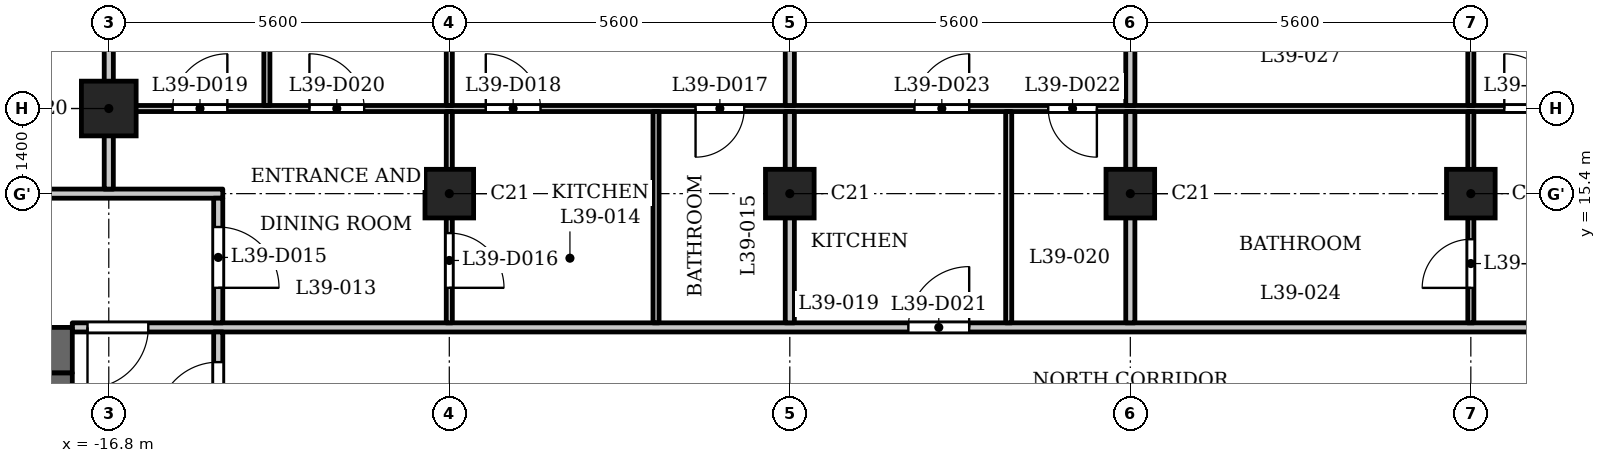
"""IFC4 building model, lengths in metres.
Left out: names, types, materials, properties, quantities, classifications, styles, units other than length and angle.
Written with IfcOpenShell. Run it as: python <this file> out.ifc"""

import sys

from ifc_helpers import new_model, si_unit, direction, frame, frame_2d, origin, origin_2d, place, context, subcontext, project, spatial, rectangle, extrude, element, fill, save


model = new_model("IFC4")
c1 = context("Model", 3, precision=1e-05, world=origin(), true_north=direction((0.0, 1.0)))
c2 = subcontext(c1, "Body", "Model", "MODEL_VIEW")
j1 = project(units=[si_unit("LENGTHUNIT", "METRE"), si_unit("PLANEANGLEUNIT", "RADIAN")], contexts=[c1])
p1 = place(None, origin())
s1 = spatial("IfcSite", under=j1, at=p1, CompositionType="ELEMENT")
p2 = place(p1, origin())
s2 = spatial("IfcBuilding", under=s1, at=p2, CompositionType="ELEMENT")
p3 = place(p2, frame((0.0, 0.0, 153.6)))
s3 = spatial("IfcBuildingStorey", under=s2, at=p3, CompositionType="ELEMENT", Elevation=153.6)
p4 = place(p3, frame((-16.8, 16.8, 0.0), z_axis=(0.0, 0.0, 1.0), x_axis=(1.0, 0.0, 0.0)))
e1 = element("IfcColumn", 1, at=p4, inside=s3, PredefinedType="COLUMN", context=c2, shape_type="SweptSolid", body=[
    extrude(rectangle(XDim=0.9, YDim=0.9, at=origin_2d()), origin(), (0.0, 0.0, 1.0), 3.5),
])
for number, where, z_axis, x_axis in (
    (2, (-11.2, 15.4, 0.0), (0.0, 0.0, 1.0), (1.0, 0.0, 0.0)),
    (3, (-5.6, 15.4, 0.0), (0.0, 0.0, 1.0), (1.0, 0.0, 0.0)),
    (4, (0.0, 15.4, 0.0), (0.0, 0.0, 1.0), (1.0, 0.0, 0.0)),
    (5, (5.6, 15.4, 0.0), (0.0, 0.0, 1.0), (1.0, 0.0, 0.0)),
):
    element("IfcColumn", number, at=place(p3, frame(where, z_axis=z_axis, x_axis=x_axis)), inside=s3, PredefinedType="COLUMN", context=c2, shape_type="SweptSolid", body=[
        extrude(rectangle(XDim=0.8, YDim=0.8, at=origin_2d()), origin(), (0.0, 0.0, 1.0), 3.5),
    ])
p5 = place(p3, frame((-17.4, 12.825, 0.0), z_axis=(0.0, 0.0, 1.0), x_axis=(-1.0, 0.0, 0.0)))
e6 = element("IfcWall", 6, at=p5, inside=s3, PredefinedType="SHEAR", context=c2, shape_type="SweptSolid", body=[
    extrude(rectangle(XDim=10.4, YDim=0.75, at=frame_2d((5.2, 0.0))), origin(), (0.0, 0.0, 1.0), 3.2),
])
p6 = place(p3, frame((-17.6, -12.45, 0.0), z_axis=(0.0, 0.0, 1.0), x_axis=(0.0, 1.0, 0.0)))
e7 = element("IfcWall", 7, at=p6, inside=s3, PredefinedType="SHEAR", context=c2, shape_type="SweptSolid", body=[
    extrude(rectangle(XDim=24.9, YDim=0.4, at=frame_2d((12.45, 0.0))), origin(), (0.0, 0.0, 1.0), 3.2),
])
p7 = place(p6, frame((6.325, 0.0, 0.0)))
e8 = element("IfcOpeningElement", 8, at=p7, cuts=e7, PredefinedType="OPENING", context=c2, shape_type="SweptSolid", body=[
    extrude(rectangle(XDim=0.9, YDim=2.1, at=frame_2d((0.45, 1.05))), frame((0.0, 0.21, 0.0), z_axis=(0.0, -1.0, 0.0), x_axis=(1.0, 0.0, 0.0)), (0.0, 0.0, 1.0), 0.42),
])
p8 = place(p6, frame((9.925, 0.0, 0.0)))
e9 = element("IfcOpeningElement", 9, at=p8, cuts=e7, PredefinedType="OPENING", context=c2, shape_type="SweptSolid", body=[
    extrude(rectangle(XDim=0.9, YDim=2.1, at=frame_2d((0.45, 1.05))), frame((0.0, 0.21, 0.0), z_axis=(0.0, -1.0, 0.0), x_axis=(1.0, 0.0, 0.0)), (0.0, 0.0, 1.0), 0.42),
])
p9 = place(p6, frame((15.6, 0.0, 0.0)))
e10 = element("IfcOpeningElement", 10, at=p9, cuts=e7, PredefinedType="OPENING", context=c2, shape_type="SweptSolid", body=[
    extrude(rectangle(XDim=1.1, YDim=2.1, at=frame_2d((0.55, 1.05))), frame((0.0, 0.21, 0.0), z_axis=(0.0, -1.0, 0.0), x_axis=(1.0, 0.0, 0.0)), (0.0, 0.0, 1.0), 0.42),
])
p10 = place(p6, frame((18.0, 0.0, 0.0)))
e11 = element("IfcOpeningElement", 11, at=p10, cuts=e7, PredefinedType="OPENING", context=c2, shape_type="SweptSolid", body=[
    extrude(rectangle(XDim=1.1, YDim=2.1, at=frame_2d((0.55, 1.05))), frame((0.0, 0.21, 0.0), z_axis=(0.0, -1.0, 0.0), x_axis=(1.0, 0.0, 0.0)), (0.0, 0.0, 1.0), 0.42),
])
p11 = place(p6, frame((23.025, 0.0, 0.0)))
e12 = element("IfcOpeningElement", 12, at=p11, cuts=e7, PredefinedType="OPENING", context=c2, shape_type="SweptSolid", body=[
    extrude(rectangle(XDim=1.1, YDim=2.1, at=frame_2d((0.55, 1.05))), frame((0.0, 0.21, 0.0), z_axis=(0.0, -1.0, 0.0), x_axis=(1.0, 0.0, 0.0)), (0.0, 0.0, 1.0), 0.42),
])
p12 = place(p6, frame((0.775, 0.0, 0.0)))
e13 = element("IfcOpeningElement", 13, at=p12, cuts=e7, PredefinedType="OPENING", context=c2, shape_type="SweptSolid", body=[
    extrude(rectangle(XDim=1.1, YDim=2.1, at=frame_2d((0.55, 1.05))), frame((0.0, 0.21, 0.0), z_axis=(0.0, -1.0, 0.0), x_axis=(1.0, 0.0, 0.0)), (0.0, 0.0, 1.0), 0.42),
])
p13 = place(p6, frame((12.925, 0.0, 0.0)))
e14 = element("IfcOpeningElement", 14, at=p13, cuts=e7, PredefinedType="OPENING", context=c2, shape_type="SweptSolid", body=[
    extrude(rectangle(XDim=1.8, YDim=2.1, at=frame_2d((0.9, 1.05))), frame((0.0, 0.21, 0.0), z_axis=(0.0, -1.0, 0.0), x_axis=(1.0, 0.0, 0.0)), (0.0, 0.0, 1.0), 0.42),
])
p14 = place(p3, frame((-17.4, 13.2, 0.0), z_axis=(0.0, 0.0, 1.0), x_axis=(1.0, 0.0, 0.0)))
e15 = element("IfcWall", 15, at=p14, inside=s3, PredefinedType="PARTITIONING", context=c2, shape_type="SweptSolid", body=[
    extrude(rectangle(XDim=34.8, YDim=0.15, at=frame_2d((17.4, 0.0))), origin(), (0.0, 0.0, 1.0), 3.2),
])
p15 = place(p14, frame((0.25, 0.0, 0.0)))
e16 = element("IfcOpeningElement", 16, at=p15, cuts=e15, PredefinedType="OPENING", context=c2, shape_type="SweptSolid", body=[
    extrude(rectangle(XDim=1.0, YDim=2.1, at=frame_2d((0.5, 1.05))), frame((0.0, 0.085, 0.0), z_axis=(0.0, -1.0, 0.0), x_axis=(1.0, 0.0, 0.0)), (0.0, 0.0, 1.0), 0.17),
])
p16 = place(p14, frame((33.65, 0.0, 0.0)))
e17 = element("IfcOpeningElement", 17, at=p16, cuts=e15, PredefinedType="OPENING", context=c2, shape_type="SweptSolid", body=[
    extrude(rectangle(XDim=1.0, YDim=2.1, at=frame_2d((0.5, 1.05))), frame((0.0, 0.085, 0.0), z_axis=(0.0, -1.0, 0.0), x_axis=(1.0, 0.0, 0.0)), (0.0, 0.0, 1.0), 0.17),
])
p17 = place(p14, frame((13.75, 0.0, 0.0)))
e18 = element("IfcOpeningElement", 18, at=p17, cuts=e15, PredefinedType="OPENING", context=c2, shape_type="SweptSolid", body=[
    extrude(rectangle(XDim=1.0, YDim=2.1, at=frame_2d((0.5, 1.05))), frame((0.0, 0.085, 0.0), z_axis=(0.0, -1.0, 0.0), x_axis=(1.0, 0.0, 0.0)), (0.0, 0.0, 1.0), 0.17),
])
p18 = place(p3, frame((-27.484, 15.4, 0.0), z_axis=(0.0, 0.0, 1.0), x_axis=(1.0, 0.0, 0.0)))
e19 = element("IfcWall", 19, at=p18, inside=s3, PredefinedType="PARTITIONING", context=c2, shape_type="SweptSolid", body=[
    extrude(rectangle(XDim=12.559, YDim=0.15, at=frame_2d((6.279, 0.0))), origin(), (0.0, 0.0, 1.0), 3.2),
])
p19 = place(p18, frame((5.784, 0.0, 0.0)))
e20 = element("IfcOpeningElement", 20, at=p19, cuts=e19, PredefinedType="OPENING", context=c2, shape_type="SweptSolid", body=[
    extrude(rectangle(XDim=1.0, YDim=2.1, at=frame_2d((0.5, 1.05))), frame((0.0, 0.085, 0.0), z_axis=(0.0, -1.0, 0.0), x_axis=(1.0, 0.0, 0.0)), (0.0, 0.0, 1.0), 0.17),
])
p20 = place(p3, frame((-16.725, 16.8, 0.0), z_axis=(0.0, 0.0, 1.0), x_axis=(1.0, 0.0, 0.0)))
e21 = element("IfcWall", 21, at=p20, inside=s3, PredefinedType="PARTITIONING", context=c2, shape_type="SweptSolid", body=[
    extrude(rectangle(XDim=33.45, YDim=0.1, at=frame_2d((16.725, 0.0))), origin(), (0.0, 0.0, 1.0), 3.2),
])
p21 = place(p20, frame((9.575, 0.0, 0.0)))
e22 = element("IfcOpeningElement", 22, at=p21, cuts=e21, PredefinedType="OPENING", context=c2, shape_type="SweptSolid", body=[
    extrude(rectangle(XDim=0.8, YDim=2.1, at=frame_2d((0.4, 1.05))), frame((0.0, 0.06, 0.0), z_axis=(0.0, -1.0, 0.0), x_axis=(1.0, 0.0, 0.0)), (0.0, 0.0, 1.0), 0.12),
])
p22 = place(p20, frame((6.125, 0.0, 0.0)))
e23 = element("IfcOpeningElement", 23, at=p22, cuts=e21, PredefinedType="OPENING", context=c2, shape_type="SweptSolid", body=[
    extrude(rectangle(XDim=0.9, YDim=2.1, at=frame_2d((0.45, 1.05))), frame((0.0, 0.06, 0.0), z_axis=(0.0, -1.0, 0.0), x_axis=(1.0, 0.0, 0.0)), (0.0, 0.0, 1.0), 0.12),
])
p23 = place(p20, frame((0.975, 0.0, 0.0)))
e24 = element("IfcOpeningElement", 24, at=p23, cuts=e21, PredefinedType="OPENING", context=c2, shape_type="SweptSolid", body=[
    extrude(rectangle(XDim=0.9, YDim=2.1, at=frame_2d((0.45, 1.05))), frame((0.0, 0.06, 0.0), z_axis=(0.0, -1.0, 0.0), x_axis=(1.0, 0.0, 0.0)), (0.0, 0.0, 1.0), 0.12),
])
p24 = place(p20, frame((3.225, 0.0, 0.0)))
e25 = element("IfcOpeningElement", 25, at=p24, cuts=e21, PredefinedType="OPENING", context=c2, shape_type="SweptSolid", body=[
    extrude(rectangle(XDim=0.9, YDim=2.1, at=frame_2d((0.45, 1.05))), frame((0.0, 0.06, 0.0), z_axis=(0.0, -1.0, 0.0), x_axis=(1.0, 0.0, 0.0)), (0.0, 0.0, 1.0), 0.12),
])
p25 = place(p20, frame((15.375, 0.0, 0.0)))
e26 = element("IfcOpeningElement", 26, at=p25, cuts=e21, PredefinedType="OPENING", context=c2, shape_type="SweptSolid", body=[
    extrude(rectangle(XDim=0.8, YDim=2.1, at=frame_2d((0.4, 1.05))), frame((0.0, 0.06, 0.0), z_axis=(0.0, -1.0, 0.0), x_axis=(1.0, 0.0, 0.0)), (0.0, 0.0, 1.0), 0.12),
])
p26 = place(p20, frame((13.175, 0.0, 0.0)))
e27 = element("IfcOpeningElement", 27, at=p26, cuts=e21, PredefinedType="OPENING", context=c2, shape_type="SweptSolid", body=[
    extrude(rectangle(XDim=0.9, YDim=2.1, at=frame_2d((0.45, 1.05))), frame((0.0, 0.06, 0.0), z_axis=(0.0, -1.0, 0.0), x_axis=(1.0, 0.0, 0.0)), (0.0, 0.0, 1.0), 0.12),
])
p27 = place(p20, frame((31.975, 0.0, 0.0)))
e28 = element("IfcOpeningElement", 28, at=p27, cuts=e21, PredefinedType="OPENING", context=c2, shape_type="SweptSolid", body=[
    extrude(rectangle(XDim=0.9, YDim=2.1, at=frame_2d((0.45, 1.05))), frame((0.0, 0.06, 0.0), z_axis=(0.0, -1.0, 0.0), x_axis=(1.0, 0.0, 0.0)), (0.0, 0.0, 1.0), 0.12),
])
p28 = place(p20, frame((22.875, 0.0, 0.0)))
e29 = element("IfcOpeningElement", 29, at=p28, cuts=e21, PredefinedType="OPENING", context=c2, shape_type="SweptSolid", body=[
    extrude(rectangle(XDim=0.9, YDim=2.1, at=frame_2d((0.45, 1.05))), frame((0.0, 0.06, 0.0), z_axis=(0.0, -1.0, 0.0), x_axis=(1.0, 0.0, 0.0)), (0.0, 0.0, 1.0), 0.12),
])
p29 = place(p3, frame((-16.8, 15.475, 0.0), z_axis=(0.0, 0.0, 1.0), x_axis=(0.0, 1.0, 0.0)))
e30 = element("IfcWall", 30, at=p29, inside=s3, PredefinedType="PARTITIONING", context=c2, shape_type="SweptSolid", body=[
    extrude(rectangle(XDim=7.455, YDim=0.15, at=frame_2d((3.728, 0.0))), origin(), (0.0, 0.0, 1.0), 3.2),
])
p30 = place(p3, frame((-15.0, 6.769, 0.0), z_axis=(0.0, 0.0, 1.0), x_axis=(0.0, 1.0, 0.0)))
e31 = element("IfcWall", 31, at=p30, inside=s3, PredefinedType="PARTITIONING", context=c2, shape_type="SweptSolid", body=[
    extrude(rectangle(XDim=6.356, YDim=0.15, at=frame_2d((3.178, 0.0))), origin(), (0.0, 0.0, 1.0), 3.2),
])
p31 = place(p30, frame((4.86, 0.0, 0.0)))
e32 = element("IfcOpeningElement", 32, at=p31, cuts=e31, PredefinedType="OPENING", context=c2, shape_type="SweptSolid", body=[
    extrude(rectangle(XDim=1.0, YDim=2.1, at=frame_2d((0.5, 1.05))), frame((0.0, 0.085, 0.0), z_axis=(0.0, -1.0, 0.0), x_axis=(1.0, 0.0, 0.0)), (0.0, 0.0, 1.0), 0.17),
])
p32 = place(p3, frame((-15.0, 13.275, 0.0), z_axis=(0.0, 0.0, 1.0), x_axis=(0.0, 1.0, 0.0)))
e33 = element("IfcWall", 33, at=p32, inside=s3, PredefinedType="PARTITIONING", context=c2, shape_type="SweptSolid", body=[
    extrude(rectangle(XDim=2.05, YDim=0.15, at=frame_2d((1.025, 0.0))), origin(), (0.0, 0.0, 1.0), 3.2),
])
p33 = place(p32, frame((0.576, 0.0, 0.0)))
e34 = element("IfcOpeningElement", 34, at=p33, cuts=e33, PredefinedType="OPENING", context=c2, shape_type="SweptSolid", body=[
    extrude(rectangle(XDim=1.0, YDim=2.1, at=frame_2d((0.5, 1.05))), frame((0.0, 0.085, 0.0), z_axis=(0.0, -1.0, 0.0), x_axis=(1.0, 0.0, 0.0)), (0.0, 0.0, 1.0), 0.17),
])
p34 = place(p3, frame((-14.2, 16.85, 0.0), z_axis=(0.0, 0.0, 1.0), x_axis=(0.0, 1.0, 0.0)))
e35 = element("IfcWall", 35, at=p34, inside=s3, PredefinedType="PARTITIONING", context=c2, shape_type="SweptSolid", body=[
    extrude(rectangle(XDim=5.23, YDim=0.1, at=frame_2d((2.615, 0.0))), origin(), (0.0, 0.0, 1.0), 3.2),
])
p35 = place(p3, frame((-11.2, 13.275, 0.0), z_axis=(0.0, 0.0, 1.0), x_axis=(0.0, 1.0, 0.0)))
e36 = element("IfcWall", 36, at=p35, inside=s3, PredefinedType="PARTITIONING", context=c2, shape_type="SweptSolid", body=[
    extrude(rectangle(XDim=3.475, YDim=0.1, at=frame_2d((1.738, 0.0))), origin(), (0.0, 0.0, 1.0), 3.2),
])
p36 = place(p35, frame((0.576, 0.0, 0.0)))
e37 = element("IfcOpeningElement", 37, at=p36, cuts=e36, PredefinedType="OPENING", context=c2, shape_type="SweptSolid", body=[
    extrude(rectangle(XDim=0.9, YDim=2.1, at=frame_2d((0.45, 1.05))), frame((0.0, 0.06, 0.0), z_axis=(0.0, -1.0, 0.0), x_axis=(1.0, 0.0, 0.0)), (0.0, 0.0, 1.0), 0.12),
])
p37 = place(p3, frame((-11.2, 16.85, 0.0), z_axis=(0.0, 0.0, 1.0), x_axis=(0.0, 1.0, 0.0)))
e38 = element("IfcWall", 38, at=p37, inside=s3, PredefinedType="PARTITIONING", context=c2, shape_type="SweptSolid", body=[
    extrude(rectangle(XDim=6.08, YDim=0.1, at=frame_2d((3.04, 0.0))), origin(), (0.0, 0.0, 1.0), 3.2),
])
p38 = place(p3, frame((-7.8, 13.275, 0.0), z_axis=(0.0, 0.0, 1.0), x_axis=(0.0, 1.0, 0.0)))
e39 = element("IfcWall", 39, at=p38, inside=s3, PredefinedType="PARTITIONING", context=c2, shape_type="SweptSolid", body=[
    extrude(rectangle(XDim=3.475, YDim=0.1, at=frame_2d((1.738, 0.0))), origin(), (0.0, 0.0, 1.0), 3.2),
])
p39 = place(p3, frame((-5.6, 13.275, 0.0), z_axis=(0.0, 0.0, 1.0), x_axis=(0.0, 1.0, 0.0)))
e40 = element("IfcWall", 40, at=p39, inside=s3, PredefinedType="PARTITIONING", context=c2, shape_type="SweptSolid", body=[
    extrude(rectangle(XDim=3.475, YDim=0.15, at=frame_2d((1.738, 0.0))), origin(), (0.0, 0.0, 1.0), 3.2),
])
p40 = place(p3, frame((-5.6, 16.85, 0.0), z_axis=(0.0, 0.0, 1.0), x_axis=(0.0, 1.0, 0.0)))
e41 = element("IfcWall", 41, at=p40, inside=s3, PredefinedType="PARTITIONING", context=c2, shape_type="SweptSolid", body=[
    extrude(rectangle(XDim=6.08, YDim=0.15, at=frame_2d((3.04, 0.0))), origin(), (0.0, 0.0, 1.0), 3.2),
])
p41 = place(p3, frame((-2.0, 13.275, 0.0), z_axis=(0.0, 0.0, 1.0), x_axis=(0.0, 1.0, 0.0)))
e42 = element("IfcWall", 42, at=p41, inside=s3, PredefinedType="PARTITIONING", context=c2, shape_type="SweptSolid", body=[
    extrude(rectangle(XDim=3.475, YDim=0.1, at=frame_2d((1.738, 0.0))), origin(), (0.0, 0.0, 1.0), 3.2),
])
p42 = place(p3, frame((0.0, 13.275, 0.0), z_axis=(0.0, 0.0, 1.0), x_axis=(0.0, 1.0, 0.0)))
e43 = element("IfcWall", 43, at=p42, inside=s3, PredefinedType="PARTITIONING", context=c2, shape_type="SweptSolid", body=[
    extrude(rectangle(XDim=3.475, YDim=0.15, at=frame_2d((1.738, 0.0))), origin(), (0.0, 0.0, 1.0), 3.2),
])
p43 = place(p3, frame((0.0, 16.85, 0.0), z_axis=(0.0, 0.0, 1.0), x_axis=(0.0, 1.0, 0.0)))
e44 = element("IfcWall", 44, at=p43, inside=s3, PredefinedType="PARTITIONING", context=c2, shape_type="SweptSolid", body=[
    extrude(rectangle(XDim=6.08, YDim=0.15, at=frame_2d((3.04, 0.0))), origin(), (0.0, 0.0, 1.0), 3.2),
])
p44 = place(p3, frame((5.6, 13.275, 0.0), z_axis=(0.0, 0.0, 1.0), x_axis=(0.0, 1.0, 0.0)))
e45 = element("IfcWall", 45, at=p44, inside=s3, PredefinedType="PARTITIONING", context=c2, shape_type="SweptSolid", body=[
    extrude(rectangle(XDim=3.475, YDim=0.1, at=frame_2d((1.738, 0.0))), origin(), (0.0, 0.0, 1.0), 3.2),
])
p45 = place(p44, frame((0.575, 0.0, 0.0)))
e46 = element("IfcOpeningElement", 46, at=p45, cuts=e45, PredefinedType="OPENING", context=c2, shape_type="SweptSolid", body=[
    extrude(rectangle(XDim=0.8, YDim=2.1, at=frame_2d((0.4, 1.05))), frame((0.0, 0.06, 0.0), z_axis=(0.0, -1.0, 0.0), x_axis=(1.0, 0.0, 0.0)), (0.0, 0.0, 1.0), 0.12),
])
p46 = place(p3, frame((5.6, 16.85, 0.0), z_axis=(0.0, 0.0, 1.0), x_axis=(0.0, 1.0, 0.0)))
e47 = element("IfcWall", 47, at=p46, inside=s3, PredefinedType="PARTITIONING", context=c2, shape_type="SweptSolid", body=[
    extrude(rectangle(XDim=6.08, YDim=0.1, at=frame_2d((3.04, 0.0))), origin(), (0.0, 0.0, 1.0), 3.2),
])
p47 = place(p46, frame((3.91, 0.0, 0.0)))
e48 = element("IfcOpeningElement", 48, at=p47, cuts=e47, PredefinedType="OPENING", context=c2, shape_type="SweptSolid", body=[
    extrude(rectangle(XDim=0.9, YDim=2.1, at=frame_2d((0.45, 1.05))), frame((0.0, 0.06, 0.0), z_axis=(0.0, -1.0, 0.0), x_axis=(1.0, 0.0, 0.0)), (0.0, 0.0, 1.0), 0.12),
])
p48 = place(p31, origin())
e49 = element("IfcDoor", 49, at=p48, inside=s3, OperationType="SINGLE_SWING_RIGHT", PredefinedType="DOOR", context=c2, shape_type="SweptSolid", body=[
    extrude(rectangle(XDim=1.0, YDim=2.1, at=frame_2d((0.5, 1.05))), frame((0.0, 0.025, 0.0), z_axis=(0.0, -1.0, 0.0), x_axis=(1.0, 0.0, 0.0)), (0.0, 0.0, 1.0), 0.05),
])
fill(e32, e49)
p49 = place(p15, origin())
e50 = element("IfcDoor", 50, at=p49, inside=s3, OperationType="SINGLE_SWING_LEFT", PredefinedType="DOOR", context=c2, shape_type="SweptSolid", body=[
    extrude(rectangle(XDim=1.0, YDim=2.1, at=frame_2d((0.5, 1.05))), frame((0.0, 0.025, 0.0), z_axis=(0.0, -1.0, 0.0), x_axis=(1.0, 0.0, 0.0)), (0.0, 0.0, 1.0), 0.05),
])
fill(e16, e50)
p50 = place(p33, origin())
e51 = element("IfcDoor", 51, at=p50, inside=s3, OperationType="SINGLE_SWING_LEFT", PredefinedType="DOOR", context=c2, shape_type="SweptSolid", body=[
    extrude(rectangle(XDim=1.0, YDim=2.1, at=frame_2d((0.5, 1.05))), frame((0.0, 0.025, 0.0), z_axis=(0.0, -1.0, 0.0), x_axis=(1.0, 0.0, 0.0)), (0.0, 0.0, 1.0), 0.05),
])
fill(e34, e51)
p51 = place(p36, origin())
e52 = element("IfcDoor", 52, at=p51, inside=s3, OperationType="SINGLE_SWING_LEFT", PredefinedType="DOOR", context=c2, shape_type="SweptSolid", body=[
    extrude(rectangle(XDim=0.9, YDim=2.1, at=frame_2d((0.45, 1.05))), frame((0.0, 0.025, 0.0), z_axis=(0.0, -1.0, 0.0), x_axis=(1.0, 0.0, 0.0)), (0.0, 0.0, 1.0), 0.05),
])
fill(e37, e52)
p52 = place(p21, origin())
e53 = element("IfcDoor", 53, at=p52, inside=s3, OperationType="SINGLE_SWING_LEFT", PredefinedType="DOOR", context=c2, shape_type="SweptSolid", body=[
    extrude(rectangle(XDim=0.8, YDim=2.1, at=frame_2d((0.4, 1.05))), frame((0.0, 0.025, 0.0), z_axis=(0.0, -1.0, 0.0), x_axis=(1.0, 0.0, 0.0)), (0.0, 0.0, 1.0), 0.05),
])
fill(e22, e53)
p53 = place(p22, origin())
e54 = element("IfcDoor", 54, at=p53, inside=s3, OperationType="SINGLE_SWING_RIGHT", PredefinedType="DOOR", context=c2, shape_type="SweptSolid", body=[
    extrude(rectangle(XDim=0.9, YDim=2.1, at=frame_2d((0.45, 1.05))), frame((0.0, 0.025, 0.0), z_axis=(0.0, -1.0, 0.0), x_axis=(1.0, 0.0, 0.0)), (0.0, 0.0, 1.0), 0.05),
])
fill(e23, e54)
p54 = place(p23, origin())
e55 = element("IfcDoor", 55, at=p54, inside=s3, OperationType="SINGLE_SWING_LEFT", PredefinedType="DOOR", context=c2, shape_type="SweptSolid", body=[
    extrude(rectangle(XDim=0.9, YDim=2.1, at=frame_2d((0.45, 1.05))), frame((0.0, 0.025, 0.0), z_axis=(0.0, -1.0, 0.0), x_axis=(1.0, 0.0, 0.0)), (0.0, 0.0, 1.0), 0.05),
])
fill(e24, e55)
p55 = place(p24, origin())
e56 = element("IfcDoor", 56, at=p55, inside=s3, OperationType="SINGLE_SWING_RIGHT", PredefinedType="DOOR", context=c2, shape_type="SweptSolid", body=[
    extrude(rectangle(XDim=0.9, YDim=2.1, at=frame_2d((0.45, 1.05))), frame((0.0, 0.025, 0.0), z_axis=(0.0, -1.0, 0.0), x_axis=(1.0, 0.0, 0.0)), (0.0, 0.0, 1.0), 0.05),
])
fill(e25, e56)
p56 = place(p17, origin())
e57 = element("IfcDoor", 57, at=p56, inside=s3, OperationType="SINGLE_SWING_LEFT", PredefinedType="DOOR", context=c2, shape_type="SweptSolid", body=[
    extrude(rectangle(XDim=1.0, YDim=2.1, at=frame_2d((0.5, 1.05))), frame((0.0, 0.025, 0.0), z_axis=(0.0, -1.0, 0.0), x_axis=(1.0, 0.0, 0.0)), (0.0, 0.0, 1.0), 0.05),
])
fill(e18, e57)
p57 = place(p25, origin())
e58 = element("IfcDoor", 58, at=p57, inside=s3, OperationType="SINGLE_SWING_RIGHT", PredefinedType="DOOR", context=c2, shape_type="SweptSolid", body=[
    extrude(rectangle(XDim=0.8, YDim=2.1, at=frame_2d((0.4, 1.05))), frame((0.0, 0.025, 0.0), z_axis=(0.0, -1.0, 0.0), x_axis=(1.0, 0.0, 0.0)), (0.0, 0.0, 1.0), 0.05),
])
fill(e26, e58)
p58 = place(p26, origin())
e59 = element("IfcDoor", 59, at=p58, inside=s3, OperationType="SINGLE_SWING_LEFT", PredefinedType="DOOR", context=c2, shape_type="SweptSolid", body=[
    extrude(rectangle(XDim=0.9, YDim=2.1, at=frame_2d((0.45, 1.05))), frame((0.0, 0.025, 0.0), z_axis=(0.0, -1.0, 0.0), x_axis=(1.0, 0.0, 0.0)), (0.0, 0.0, 1.0), 0.05),
])
fill(e27, e59)
p59 = place(p45, origin())
e60 = element("IfcDoor", 60, at=p59, inside=s3, OperationType="SINGLE_SWING_RIGHT", PredefinedType="DOOR", context=c2, shape_type="SweptSolid", body=[
    extrude(rectangle(XDim=0.8, YDim=2.1, at=frame_2d((0.4, 1.05))), frame((0.0, 0.025, 0.0), z_axis=(0.0, -1.0, 0.0), x_axis=(1.0, 0.0, 0.0)), (0.0, 0.0, 1.0), 0.05),
])
fill(e46, e60)
p60 = place(p28, origin())
e61 = element("IfcDoor", 61, at=p60, inside=s3, OperationType="SINGLE_SWING_RIGHT", PredefinedType="DOOR", context=c2, shape_type="SweptSolid", body=[
    extrude(rectangle(XDim=0.9, YDim=2.1, at=frame_2d((0.45, 1.05))), frame((0.0, 0.025, 0.0), z_axis=(0.0, -1.0, 0.0), x_axis=(1.0, 0.0, 0.0)), (0.0, 0.0, 1.0), 0.05),
])
fill(e29, e61)
save(model, sys.argv[1])
